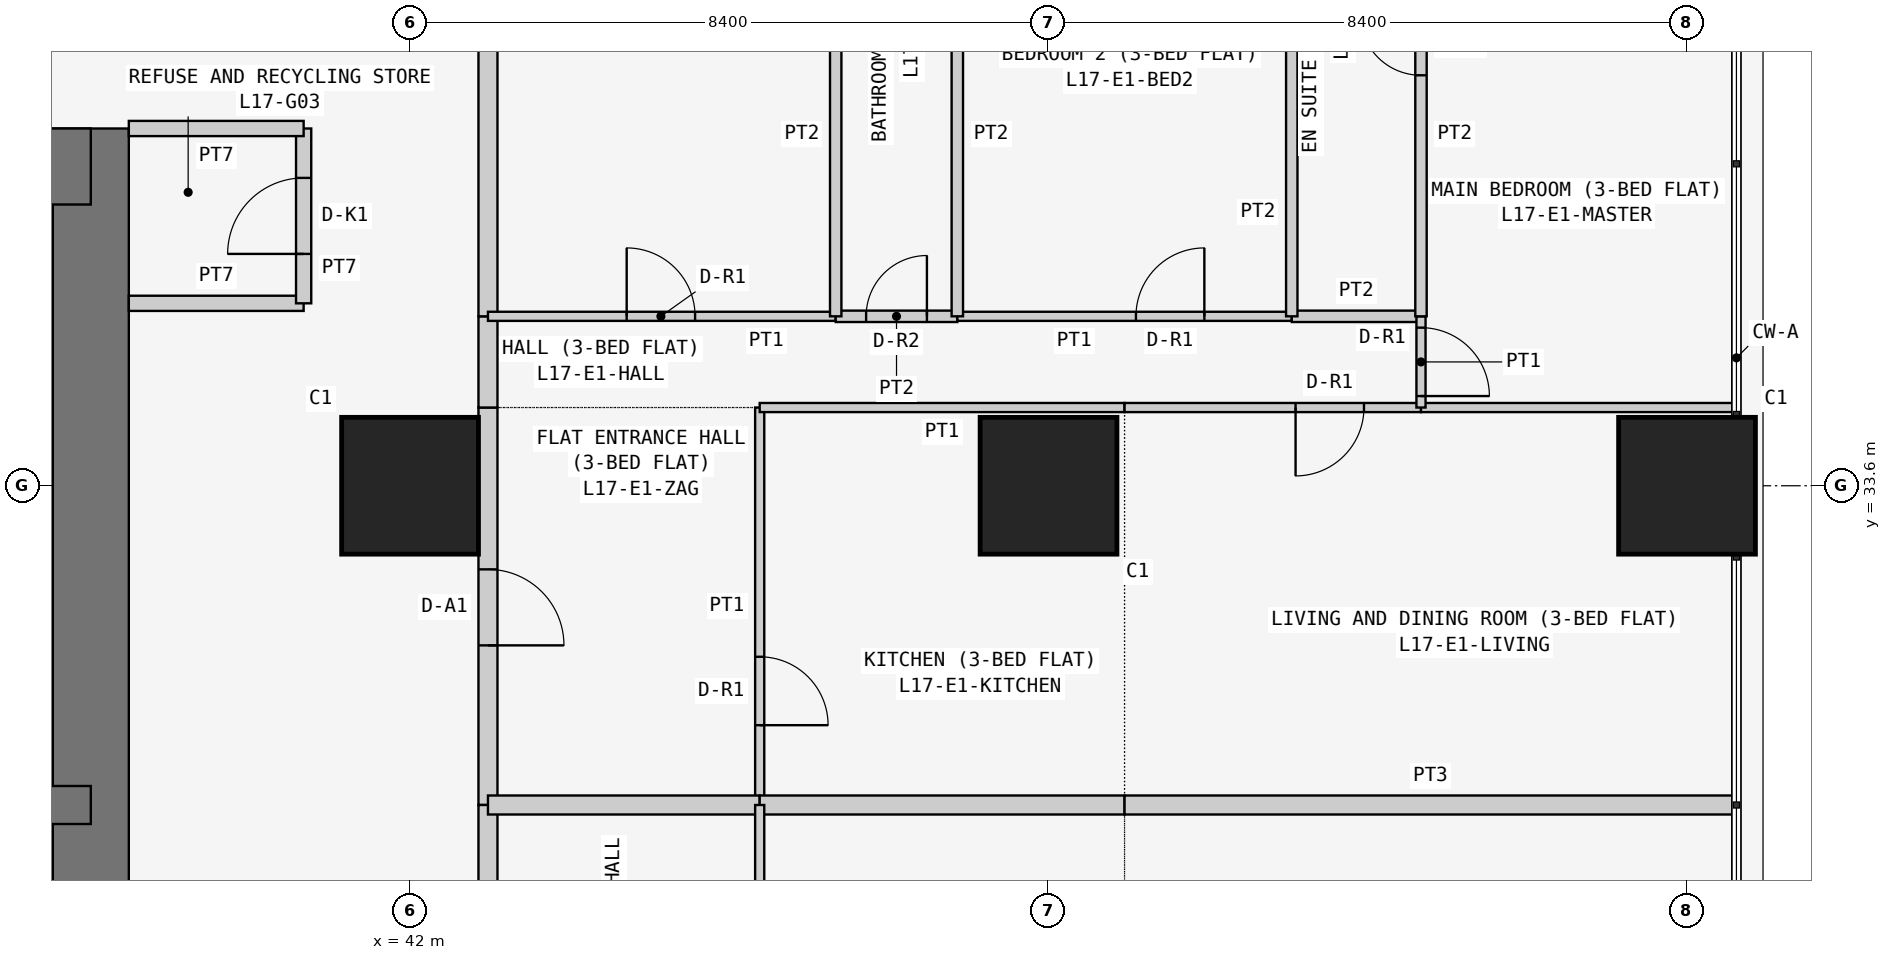
"""IFC4 building model, lengths in metres.
Left out: names, types, materials, properties, quantities, classifications, styles, units other than length and angle.
Written with IfcOpenShell. Run it as: python <this file> out.ifc"""

import sys

from ifc_helpers import new_model, si_unit, direction, frame, frame_2d, origin, origin_2d, place, context, subcontext, project, spatial, rectangle, extrude, element, fill, save


model = new_model("IFC4")
c1 = context("Model", 3, precision=1e-05, world=origin(), true_north=direction((0.0, 1.0)))
c2 = subcontext(c1, "Body", "Model", "MODEL_VIEW")
j1 = project(units=[si_unit("LENGTHUNIT", "METRE"), si_unit("PLANEANGLEUNIT", "RADIAN")], contexts=[c1])
p1 = place(None, origin())
s1 = spatial("IfcSite", under=j1, at=p1, CompositionType="ELEMENT")
p2 = place(p1, origin())
s2 = spatial("IfcBuilding", under=s1, at=p2, CompositionType="ELEMENT")
p3 = place(p2, frame((0.0, 0.0, 70.5)))
s3 = spatial("IfcBuildingStorey", under=s2, at=p3, CompositionType="ELEMENT", Elevation=70.5)
for number, where, z_axis, x_axis in (
    (1, (42.0, 33.6, 0.0), (0.0, 0.0, 1.0), (1.0, 0.0, 0.0)),
    (2, (50.4, 33.6, 0.0), (0.0, 0.0, 1.0), (1.0, 0.0, 0.0)),
    (3, (58.8, 33.6, 0.0), (0.0, 0.0, 1.0), (1.0, 0.0, 0.0)),
):
    element("IfcColumn", number, at=place(p3, frame(where, z_axis=z_axis, x_axis=x_axis)), inside=s3, PredefinedType="COLUMN", context=c2, shape_type="SweptSolid", body=[
        extrude(rectangle(XDim=1.8, YDim=1.8, at=origin_2d()), origin(), (0.0, 0.0, 1.0), 3.6),
    ])
p4 = place(p3, frame((37.8, 21.0, 0.0), z_axis=(0.0, 0.0, 1.0), x_axis=(0.0, 1.0, 0.0)))
e4 = element("IfcWall", 4, at=p4, inside=s3, PredefinedType="SHEAR", context=c2, shape_type="SweptSolid", body=[
    extrude(rectangle(XDim=17.3, YDim=1.0, at=frame_2d((8.65, 0.0))), origin(), (0.0, 0.0, 1.0), 3.6),
])
p5 = place(p4, frame((5.2, 0.0, 0.0)))
e5 = element("IfcOpeningElement", 5, at=p5, cuts=e4, PredefinedType="OPENING", context=c2, shape_type="SweptSolid", body=[
    extrude(rectangle(XDim=1.2, YDim=2.1, at=frame_2d((0.6, 1.05))), frame((0.0, 0.51, 0.0), z_axis=(0.0, -1.0, 0.0), x_axis=(1.0, 0.0, 0.0)), (0.0, 0.0, 1.0), 1.02),
])
p6 = place(p3, frame((37.8, 37.8, 0.0), z_axis=(0.0, 0.0, 1.0), x_axis=(-1.0, 0.0, 0.0)))
e6 = element("IfcWall", 6, at=p6, inside=s3, PredefinedType="SHEAR", context=c2, shape_type="SweptSolid", body=[
    extrude(rectangle(XDim=17.3, YDim=1.0, at=frame_2d((8.65, 0.0))), origin(), (0.0, 0.0, 1.0), 3.6),
])
p7 = place(p3, frame((32.2, 29.4, 0.0), z_axis=(0.0, 0.0, 1.0), x_axis=(1.0, 0.0, 0.0)))
e7 = element("IfcWall", 7, at=p7, inside=s3, PredefinedType="SHEAR", context=c2, shape_type="SweptSolid", body=[
    extrude(rectangle(XDim=5.6, YDim=0.5, at=frame_2d((2.8, 0.0))), origin(), (0.0, 0.0, 1.0), 3.6),
])
p8 = place(p7, frame((2.0, 0.0, 0.0)))
e8 = element("IfcOpeningElement", 8, at=p8, cuts=e7, PredefinedType="OPENING", context=c2, shape_type="SweptSolid", body=[
    extrude(rectangle(XDim=1.2, YDim=2.1, at=frame_2d((0.6, 1.05))), frame((0.0, 0.26, 0.0), z_axis=(0.0, -1.0, 0.0), x_axis=(1.0, 0.0, 0.0)), (0.0, 0.0, 1.0), 0.52),
])
p9 = place(p3, frame((38.3, 36.0, 0.0), z_axis=(0.0, 0.0, 1.0), x_axis=(1.0, 0.0, 0.0)))
e9 = element("IfcWall", 9, at=p9, inside=s3, PredefinedType="PARTITIONING", context=c2, shape_type="SweptSolid", body=[
    extrude(rectangle(XDim=2.3, YDim=0.2, at=frame_2d((1.15, 0.0))), origin(), (0.0, 0.0, 1.0), 3.45),
])
p10 = place(p3, frame((40.6, 36.0, 0.0), z_axis=(0.0, 0.0, 1.0), x_axis=(0.0, 1.0, 0.0)))
e10 = element("IfcWall", 10, at=p10, inside=s3, PredefinedType="PARTITIONING", context=c2, shape_type="SweptSolid", body=[
    extrude(rectangle(XDim=2.3, YDim=0.2, at=frame_2d((1.15, 0.0))), origin(), (0.0, 0.0, 1.0), 3.45),
])
p11 = place(p10, frame((0.65, 0.0, 0.0)))
e11 = element("IfcOpeningElement", 11, at=p11, cuts=e10, PredefinedType="OPENING", context=c2, shape_type="SweptSolid", body=[
    extrude(rectangle(XDim=1.0, YDim=2.1, at=frame_2d((0.5, 1.05))), frame((0.0, 0.11, 0.0), z_axis=(0.0, -1.0, 0.0), x_axis=(1.0, 0.0, 0.0)), (0.0, 0.0, 1.0), 0.22),
])
p12 = place(p3, frame((40.6, 38.3, 0.0), z_axis=(0.0, 0.0, 1.0), x_axis=(-1.0, 0.0, 0.0)))
e12 = element("IfcWall", 12, at=p12, inside=s3, PredefinedType="PARTITIONING", context=c2, shape_type="SweptSolid", body=[
    extrude(rectangle(XDim=2.3, YDim=0.2, at=frame_2d((1.15, 0.0))), origin(), (0.0, 0.0, 1.0), 3.45),
])
p13 = place(p3, frame((43.025, 34.629, 0.0), z_axis=(0.0, 0.0, 1.0), x_axis=(0.0, -1.0, 0.0)))
e13 = element("IfcWall", 13, at=p13, inside=s3, PredefinedType="PARTITIONING", context=c2, shape_type="SweptSolid", body=[
    extrude(rectangle(XDim=5.229, YDim=0.25, at=frame_2d((2.615, 0.0))), origin(), (0.0, 0.0, 1.0), 3.45),
])
p14 = place(p13, frame((2.129, 0.0, 0.0)))
e14 = element("IfcOpeningElement", 14, at=p14, cuts=e13, PredefinedType="OPENING", context=c2, shape_type="SweptSolid", body=[
    extrude(rectangle(XDim=1.0, YDim=2.1, at=frame_2d((0.5, 1.05))), frame((0.0, 0.135, 0.0), z_axis=(0.0, -1.0, 0.0), x_axis=(1.0, 0.0, 0.0)), (0.0, 0.0, 1.0), 0.27),
])
p15 = place(p3, frame((43.025, 35.829, 0.0), z_axis=(0.0, 0.0, 1.0), x_axis=(0.0, -1.0, 0.0)))
e15 = element("IfcWall", 15, at=p15, inside=s3, PredefinedType="PARTITIONING", context=c2, shape_type="SweptSolid", body=[
    extrude(rectangle(XDim=1.2, YDim=0.25, at=frame_2d((0.6, 0.0))), origin(), (0.0, 0.0, 1.0), 3.45),
])
p16 = place(p3, frame((43.025, 42.7, 0.0), z_axis=(0.0, 0.0, 1.0), x_axis=(0.0, -1.0, 0.0)))
e16 = element("IfcWall", 16, at=p16, inside=s3, PredefinedType="PARTITIONING", context=c2, shape_type="SweptSolid", body=[
    extrude(rectangle(XDim=6.871, YDim=0.25, at=frame_2d((3.436, 0.0))), origin(), (0.0, 0.0, 1.0), 3.45),
])
p17 = place(p3, frame((43.025, 29.4, 0.0), z_axis=(0.0, 0.0, 1.0), x_axis=(0.0, -1.0, 0.0)))
e17 = element("IfcWall", 17, at=p17, inside=s3, PredefinedType="PARTITIONING", context=c2, shape_type="SweptSolid", body=[
    extrude(rectangle(XDim=5.229, YDim=0.25, at=frame_2d((2.615, 0.0))), origin(), (0.0, 0.0, 1.0), 3.45),
])
p18 = place(p17, frame((2.1, 0.0, 0.0)))
e18 = element("IfcOpeningElement", 18, at=p18, cuts=e17, PredefinedType="OPENING", context=c2, shape_type="SweptSolid", body=[
    extrude(rectangle(XDim=1.0, YDim=2.1, at=frame_2d((0.5, 1.05))), frame((0.0, 0.135, 0.0), z_axis=(0.0, -1.0, 0.0), x_axis=(1.0, 0.0, 0.0)), (0.0, 0.0, 1.0), 0.27),
])
p19 = place(p3, frame((46.6, 29.4, 0.0), z_axis=(0.0, 0.0, 1.0), x_axis=(0.0, 1.0, 0.0)))
e19 = element("IfcWall", 19, at=p19, inside=s3, PredefinedType="PARTITIONING", context=c2, shape_type="SweptSolid", body=[
    extrude(rectangle(XDim=5.229, YDim=0.12, at=frame_2d((2.615, 0.0))), origin(), (0.0, 0.0, 1.0), 3.45),
])
p20 = place(p19, frame((1.05, 0.0, 0.0)))
e20 = element("IfcOpeningElement", 20, at=p20, cuts=e19, PredefinedType="OPENING", context=c2, shape_type="SweptSolid", body=[
    extrude(rectangle(XDim=0.9, YDim=2.1, at=frame_2d((0.45, 1.05))), frame((0.0, 0.07, 0.0), z_axis=(0.0, -1.0, 0.0), x_axis=(1.0, 0.0, 0.0)), (0.0, 0.0, 1.0), 0.14),
])
p21 = place(p3, frame((43.025, 29.4, 0.0), z_axis=(0.0, 0.0, 1.0), x_axis=(1.0, 0.0, 0.0)))
e21 = element("IfcWall", 21, at=p21, inside=s3, PredefinedType="PARTITIONING", context=c2, shape_type="SweptSolid", body=[
    extrude(rectangle(XDim=3.575, YDim=0.25, at=frame_2d((1.788, 0.0))), origin(), (0.0, 0.0, 1.0), 3.45),
])
p22 = place(p3, frame((51.4, 34.629, 0.0), z_axis=(0.0, 0.0, 1.0), x_axis=(-1.0, 0.0, 0.0)))
e22 = element("IfcWall", 22, at=p22, inside=s3, PredefinedType="PARTITIONING", context=c2, shape_type="SweptSolid", body=[
    extrude(rectangle(XDim=4.8, YDim=0.12, at=frame_2d((2.4, 0.0))), origin(), (0.0, 0.0, 1.0), 3.45),
])
p23 = place(p3, frame((46.6, 29.4, 0.0), z_axis=(0.0, 0.0, 1.0), x_axis=(1.0, 0.0, 0.0)))
e23 = element("IfcWall", 23, at=p23, inside=s3, PredefinedType="PARTITIONING", context=c2, shape_type="SweptSolid", body=[
    extrude(rectangle(XDim=4.8, YDim=0.25, at=frame_2d((2.4, 0.0))), origin(), (0.0, 0.0, 1.0), 3.45),
])
p24 = place(p3, frame((55.3, 34.629, 0.0), z_axis=(0.0, 0.0, 1.0), x_axis=(-1.0, 0.0, 0.0)))
e24 = element("IfcWall", 24, at=p24, inside=s3, PredefinedType="PARTITIONING", context=c2, shape_type="SweptSolid", body=[
    extrude(rectangle(XDim=3.9, YDim=0.12, at=frame_2d((1.95, 0.0))), origin(), (0.0, 0.0, 1.0), 3.45),
])
p25 = place(p24, frame((0.75, 0.0, 0.0)))
e25 = element("IfcOpeningElement", 25, at=p25, cuts=e24, PredefinedType="OPENING", context=c2, shape_type="SweptSolid", body=[
    extrude(rectangle(XDim=0.9, YDim=2.1, at=frame_2d((0.45, 1.05))), frame((0.0, 0.07, 0.0), z_axis=(0.0, -1.0, 0.0), x_axis=(1.0, 0.0, 0.0)), (0.0, 0.0, 1.0), 0.14),
])
p26 = place(p3, frame((59.45, 34.629, 0.0), z_axis=(0.0, 0.0, 1.0), x_axis=(-1.0, 0.0, 0.0)))
e26 = element("IfcWall", 26, at=p26, inside=s3, PredefinedType="PARTITIONING", context=c2, shape_type="SweptSolid", body=[
    extrude(rectangle(XDim=4.15, YDim=0.12, at=frame_2d((2.075, 0.0))), origin(), (0.0, 0.0, 1.0), 3.45),
])
p27 = place(p3, frame((51.4, 29.4, 0.0), z_axis=(0.0, 0.0, 1.0), x_axis=(1.0, 0.0, 0.0)))
e27 = element("IfcWall", 27, at=p27, inside=s3, PredefinedType="PARTITIONING", context=c2, shape_type="SweptSolid", body=[
    extrude(rectangle(XDim=8.05, YDim=0.25, at=frame_2d((4.025, 0.0))), origin(), (0.0, 0.0, 1.0), 3.45),
])
p28 = place(p3, frame((47.6, 35.829, 0.0), z_axis=(0.0, 0.0, 1.0), x_axis=(-1.0, 0.0, 0.0)))
e28 = element("IfcWall", 28, at=p28, inside=s3, PredefinedType="PARTITIONING", context=c2, shape_type="SweptSolid", body=[
    extrude(rectangle(XDim=4.575, YDim=0.12, at=frame_2d((2.288, 0.0))), origin(), (0.0, 0.0, 1.0), 3.45),
])
p29 = place(p28, frame((1.85, 0.0, 0.0)))
e29 = element("IfcOpeningElement", 29, at=p29, cuts=e28, PredefinedType="OPENING", context=c2, shape_type="SweptSolid", body=[
    extrude(rectangle(XDim=0.9, YDim=2.1, at=frame_2d((0.45, 1.05))), frame((0.0, 0.07, 0.0), z_axis=(0.0, -1.0, 0.0), x_axis=(1.0, 0.0, 0.0)), (0.0, 0.0, 1.0), 0.14),
])
p30 = place(p3, frame((49.2, 35.829, 0.0), z_axis=(0.0, 0.0, 1.0), x_axis=(-1.0, 0.0, 0.0)))
e30 = element("IfcWall", 30, at=p30, inside=s3, PredefinedType="PARTITIONING", context=c2, shape_type="SweptSolid", body=[
    extrude(rectangle(XDim=1.6, YDim=0.15, at=frame_2d((0.8, 0.0))), origin(), (0.0, 0.0, 1.0), 3.45),
])
p31 = place(p30, frame((0.4, 0.0, 0.0)))
e31 = element("IfcOpeningElement", 31, at=p31, cuts=e30, PredefinedType="OPENING", context=c2, shape_type="SweptSolid", body=[
    extrude(rectangle(XDim=0.8, YDim=2.1, at=frame_2d((0.4, 1.05))), frame((0.0, 0.085, 0.0), z_axis=(0.0, -1.0, 0.0), x_axis=(1.0, 0.0, 0.0)), (0.0, 0.0, 1.0), 0.17),
])
p32 = place(p3, frame((53.6, 35.829, 0.0), z_axis=(0.0, 0.0, 1.0), x_axis=(-1.0, 0.0, 0.0)))
e32 = element("IfcWall", 32, at=p32, inside=s3, PredefinedType="PARTITIONING", context=c2, shape_type="SweptSolid", body=[
    extrude(rectangle(XDim=4.4, YDim=0.12, at=frame_2d((2.2, 0.0))), origin(), (0.0, 0.0, 1.0), 3.45),
])
p33 = place(p32, frame((1.15, 0.0, 0.0)))
e33 = element("IfcOpeningElement", 33, at=p33, cuts=e32, PredefinedType="OPENING", context=c2, shape_type="SweptSolid", body=[
    extrude(rectangle(XDim=0.9, YDim=2.1, at=frame_2d((0.45, 1.05))), frame((0.0, 0.07, 0.0), z_axis=(0.0, -1.0, 0.0), x_axis=(1.0, 0.0, 0.0)), (0.0, 0.0, 1.0), 0.14),
])
p34 = place(p3, frame((55.3, 35.829, 0.0), z_axis=(0.0, 0.0, 1.0), x_axis=(-1.0, 0.0, 0.0)))
e34 = element("IfcWall", 34, at=p34, inside=s3, PredefinedType="PARTITIONING", context=c2, shape_type="SweptSolid", body=[
    extrude(rectangle(XDim=1.7, YDim=0.15, at=frame_2d((0.85, 0.0))), origin(), (0.0, 0.0, 1.0), 3.45),
])
p35 = place(p3, frame((55.3, 34.629, 0.0), z_axis=(0.0, 0.0, 1.0), x_axis=(0.0, 1.0, 0.0)))
e35 = element("IfcWall", 35, at=p35, inside=s3, PredefinedType="PARTITIONING", context=c2, shape_type="SweptSolid", body=[
    extrude(rectangle(XDim=1.2, YDim=0.12, at=frame_2d((0.6, 0.0))), origin(), (0.0, 0.0, 1.0), 3.45),
])
p36 = place(p35, frame((0.151, 0.0, 0.0)))
e36 = element("IfcOpeningElement", 36, at=p36, cuts=e35, PredefinedType="OPENING", context=c2, shape_type="SweptSolid", body=[
    extrude(rectangle(XDim=0.9, YDim=2.1, at=frame_2d((0.45, 1.05))), frame((0.0, 0.07, 0.0), z_axis=(0.0, -1.0, 0.0), x_axis=(1.0, 0.0, 0.0)), (0.0, 0.0, 1.0), 0.14),
])
for number, where, z_axis, x_axis in (
    (37, (47.6, 35.829, 0.0), (0.0, 0.0, 1.0), (0.0, 1.0, 0.0)),
    (38, (49.2, 35.829, 0.0), (0.0, 0.0, 1.0), (0.0, 1.0, 0.0)),
    (39, (53.6, 35.829, 0.0), (0.0, 0.0, 1.0), (0.0, 1.0, 0.0)),
):
    element("IfcWall", number, at=place(p3, frame(where, z_axis=z_axis, x_axis=x_axis)), inside=s3, PredefinedType="PARTITIONING", context=c2, shape_type="SweptSolid", body=[
        extrude(rectangle(XDim=6.871, YDim=0.15, at=frame_2d((3.436, 0.0))), origin(), (0.0, 0.0, 1.0), 3.45),
    ])
p37 = place(p3, frame((55.3, 35.829, 0.0), z_axis=(0.0, 0.0, 1.0), x_axis=(0.0, 1.0, 0.0)))
e40 = element("IfcWall", 40, at=p37, inside=s3, PredefinedType="PARTITIONING", context=c2, shape_type="SweptSolid", body=[
    extrude(rectangle(XDim=6.871, YDim=0.15, at=frame_2d((3.436, 0.0))), origin(), (0.0, 0.0, 1.0), 3.45),
])
p38 = place(p37, frame((3.171, 0.0, 0.0)))
e41 = element("IfcOpeningElement", 41, at=p38, cuts=e40, PredefinedType="OPENING", context=c2, shape_type="SweptSolid", body=[
    extrude(rectangle(XDim=0.8, YDim=2.1, at=frame_2d((0.4, 1.05))), frame((0.0, 0.085, 0.0), z_axis=(0.0, -1.0, 0.0), x_axis=(1.0, 0.0, 0.0)), (0.0, 0.0, 1.0), 0.17),
])
p39 = place(p3, frame((46.6, 29.4, 0.0), z_axis=(0.0, 0.0, 1.0), x_axis=(0.0, -1.0, 0.0)))
e42 = element("IfcWall", 42, at=p39, inside=s3, PredefinedType="PARTITIONING", context=c2, shape_type="SweptSolid", body=[
    extrude(rectangle(XDim=5.229, YDim=0.12, at=frame_2d((2.615, 0.0))), origin(), (0.0, 0.0, 1.0), 3.45),
])
p40 = place(p39, frame((1.05, 0.0, 0.0)))
e43 = element("IfcOpeningElement", 43, at=p40, cuts=e42, PredefinedType="OPENING", context=c2, shape_type="SweptSolid", body=[
    extrude(rectangle(XDim=0.9, YDim=2.1, at=frame_2d((0.45, 1.05))), frame((0.0, 0.07, 0.0), z_axis=(0.0, -1.0, 0.0), x_axis=(1.0, 0.0, 0.0)), (0.0, 0.0, 1.0), 0.14),
])
p41 = place(p11, origin())
e44 = element("IfcDoor", 44, at=p41, inside=s3, OperationType="SINGLE_SWING_LEFT", PredefinedType="DOOR", context=c2, shape_type="SweptSolid", body=[
    extrude(rectangle(XDim=1.0, YDim=2.1, at=frame_2d((0.5, 1.05))), frame((0.0, 0.025, 0.0), z_axis=(0.0, -1.0, 0.0), x_axis=(1.0, 0.0, 0.0)), (0.0, 0.0, 1.0), 0.05),
])
fill(e11, e44)
p42 = place(p14, origin())
e45 = element("IfcDoor", 45, at=p42, inside=s3, OperationType="SINGLE_SWING_RIGHT", PredefinedType="DOOR", context=c2, shape_type="SweptSolid", body=[
    extrude(rectangle(XDim=1.0, YDim=2.1, at=frame_2d((0.5, 1.05))), frame((0.0, 0.025, 0.0), z_axis=(0.0, -1.0, 0.0), x_axis=(1.0, 0.0, 0.0)), (0.0, 0.0, 1.0), 0.05),
])
fill(e14, e45)
p43 = place(p20, frame((0.9, 0.0, 0.0), z_axis=(0.0, 0.0, 1.0), x_axis=(-1.0, 0.0, 0.0)))
e46 = element("IfcDoor", 46, at=p43, inside=s3, OperationType="SINGLE_SWING_RIGHT", PredefinedType="DOOR", context=c2, shape_type="SweptSolid", body=[
    extrude(rectangle(XDim=0.9, YDim=2.1, at=frame_2d((0.45, 1.05))), frame((0.0, 0.025, 0.0), z_axis=(0.0, -1.0, 0.0), x_axis=(1.0, 0.0, 0.0)), (0.0, 0.0, 1.0), 0.05),
])
fill(e20, e46)
p44 = place(p25, origin())
e47 = element("IfcDoor", 47, at=p44, inside=s3, OperationType="SINGLE_SWING_RIGHT", PredefinedType="DOOR", context=c2, shape_type="SweptSolid", body=[
    extrude(rectangle(XDim=0.9, YDim=2.1, at=frame_2d((0.45, 1.05))), frame((0.0, 0.025, 0.0), z_axis=(0.0, -1.0, 0.0), x_axis=(1.0, 0.0, 0.0)), (0.0, 0.0, 1.0), 0.05),
])
fill(e25, e47)
p45 = place(p29, frame((0.9, 0.0, 0.0), z_axis=(0.0, 0.0, 1.0), x_axis=(-1.0, 0.0, 0.0)))
e48 = element("IfcDoor", 48, at=p45, inside=s3, OperationType="SINGLE_SWING_LEFT", PredefinedType="DOOR", context=c2, shape_type="SweptSolid", body=[
    extrude(rectangle(XDim=0.9, YDim=2.1, at=frame_2d((0.45, 1.05))), frame((0.0, 0.025, 0.0), z_axis=(0.0, -1.0, 0.0), x_axis=(1.0, 0.0, 0.0)), (0.0, 0.0, 1.0), 0.05),
])
fill(e29, e48)
p46 = place(p31, frame((0.8, 0.0, 0.0), z_axis=(0.0, 0.0, 1.0), x_axis=(-1.0, 0.0, 0.0)))
e49 = element("IfcDoor", 49, at=p46, inside=s3, OperationType="SINGLE_SWING_RIGHT", PredefinedType="DOOR", context=c2, shape_type="SweptSolid", body=[
    extrude(rectangle(XDim=0.8, YDim=2.1, at=frame_2d((0.4, 1.05))), frame((0.0, 0.025, 0.0), z_axis=(0.0, -1.0, 0.0), x_axis=(1.0, 0.0, 0.0)), (0.0, 0.0, 1.0), 0.05),
])
fill(e31, e49)
p47 = place(p33, frame((0.9, 0.0, 0.0), z_axis=(0.0, 0.0, 1.0), x_axis=(-1.0, 0.0, 0.0)))
e50 = element("IfcDoor", 50, at=p47, inside=s3, OperationType="SINGLE_SWING_RIGHT", PredefinedType="DOOR", context=c2, shape_type="SweptSolid", body=[
    extrude(rectangle(XDim=0.9, YDim=2.1, at=frame_2d((0.45, 1.05))), frame((0.0, 0.025, 0.0), z_axis=(0.0, -1.0, 0.0), x_axis=(1.0, 0.0, 0.0)), (0.0, 0.0, 1.0), 0.05),
])
fill(e33, e50)
p48 = place(p36, frame((0.9, 0.0, 0.0), z_axis=(0.0, 0.0, 1.0), x_axis=(-1.0, 0.0, 0.0)))
e51 = element("IfcDoor", 51, at=p48, inside=s3, OperationType="SINGLE_SWING_RIGHT", PredefinedType="DOOR", context=c2, shape_type="SweptSolid", body=[
    extrude(rectangle(XDim=0.9, YDim=2.1, at=frame_2d((0.45, 1.05))), frame((0.0, 0.025, 0.0), z_axis=(0.0, -1.0, 0.0), x_axis=(1.0, 0.0, 0.0)), (0.0, 0.0, 1.0), 0.05),
])
fill(e36, e51)
p49 = place(p38, origin())
e52 = element("IfcDoor", 52, at=p49, inside=s3, OperationType="SINGLE_SWING_RIGHT", PredefinedType="DOOR", context=c2, shape_type="SweptSolid", body=[
    extrude(rectangle(XDim=0.8, YDim=2.1, at=frame_2d((0.4, 1.05))), frame((0.0, 0.025, 0.0), z_axis=(0.0, -1.0, 0.0), x_axis=(1.0, 0.0, 0.0)), (0.0, 0.0, 1.0), 0.05),
])
fill(e41, e52)
save(model, sys.argv[1])
